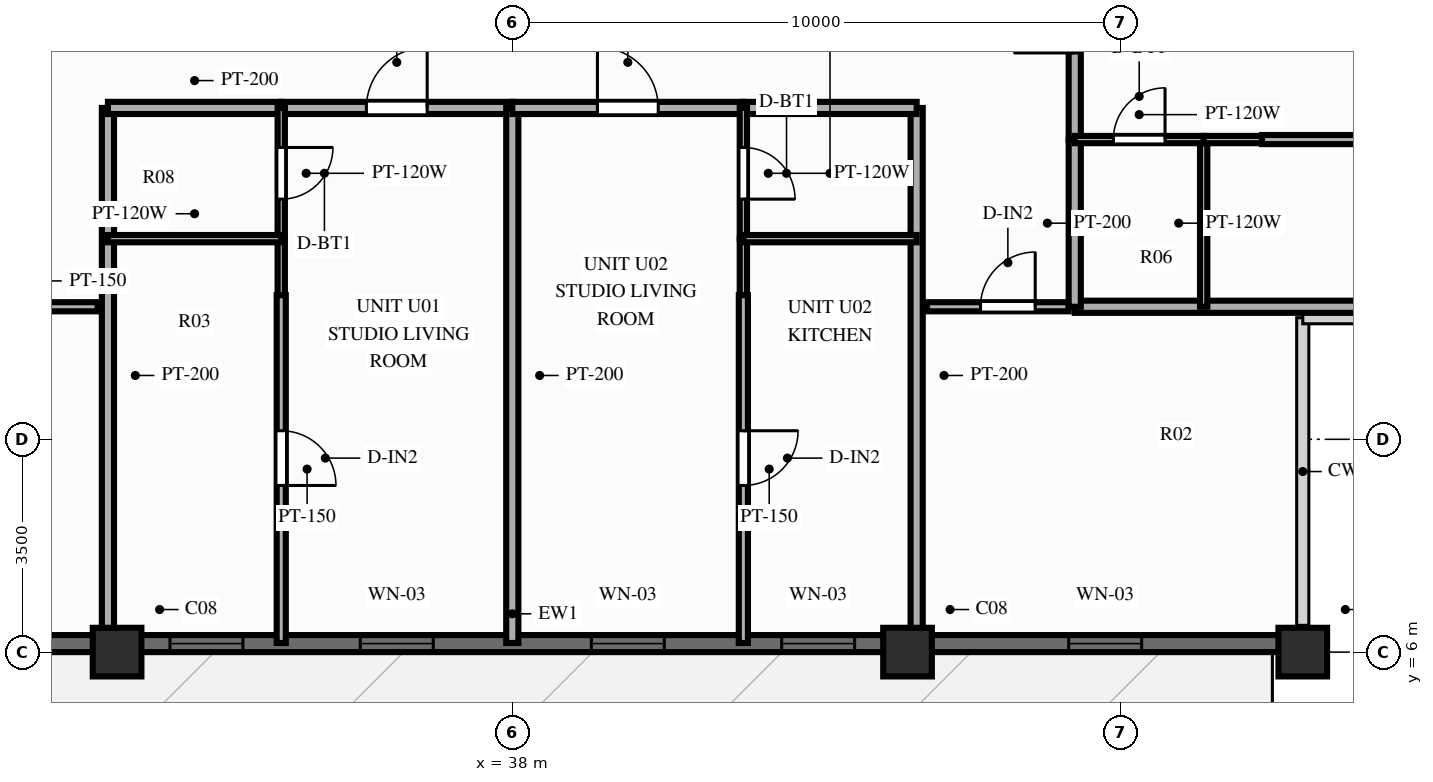
"""IFC4 building model, lengths in metres.
Left out: names, types, materials, properties, quantities, classifications, styles, units other than length and angle.
Written with IfcOpenShell. Run it as: python <this file> out.ifc"""

import sys

from ifc_helpers import new_model, si_unit, direction, frame, frame_2d, origin, origin_2d, place, context, subcontext, project, spatial, rectangle, extrude, source, transform, mapped, element, fill, save


model = new_model("IFC4")
c1 = context("Model", 3, precision=1e-05, world=origin(), true_north=direction((0.0, 1.0)))
c2 = subcontext(c1, "Body", "Model", "MODEL_VIEW")
j1 = project(units=[si_unit("LENGTHUNIT", "METRE"), si_unit("PLANEANGLEUNIT", "RADIAN")], contexts=[c1])
p1 = place(None, origin())
s1 = spatial("IfcSite", under=j1, at=p1, CompositionType="ELEMENT")
p2 = place(p1, origin())
s2 = spatial("IfcBuilding", under=s1, at=p2, CompositionType="ELEMENT")
p3 = place(p2, frame((0.0, 0.0, 196.6)))
s3 = spatial("IfcBuildingStorey", under=s2, at=p3, CompositionType="ELEMENT", Elevation=196.6)
m1 = source(origin(), c2, "Body", "SweptSolid", [
    extrude(rectangle(XDim=0.8, YDim=0.8, at=origin_2d()), origin(), (0.0, 0.0, 1.0), 3.0),
])
for number, where, z_axis, x_axis in (
    (1, (31.5, 6.0, 0.0), (0.0, 0.0, 1.0), (1.0, 0.0, 0.0)),
    (2, (44.5, 6.0, 0.0), (0.0, 0.0, 1.0), (1.0, 0.0, 0.0)),
    (3, (51.0, 6.0, 0.0), (0.0, 0.0, 1.0), (1.0, 0.0, 0.0)),
):
    element("IfcColumn", number, at=place(p3, frame(where, z_axis=z_axis, x_axis=x_axis)), inside=s3, PredefinedType="COLUMN", context=c2, shape_type="MappedRepresentation", body=[
        mapped(m1, transform((0.0, 0.0, 0.0), scale=1.0)),
    ])
p4 = place(p3, frame((25.0, 6.14, 0.0), z_axis=(0.0, 0.0, 1.0), x_axis=(1.0, 0.0, 0.0)))
e4 = element("IfcWall", 4, at=p4, inside=s3, PredefinedType="SOLIDWALL", context=c2, shape_type="SweptSolid", body=[
    extrude(rectangle(XDim=26.0, YDim=0.28, at=frame_2d((13.0, 0.0))), origin(), (0.0, 0.0, 1.0), 2.28),
])
p5 = place(p4, frame((3.8, 0.0, 0.0), z_axis=(0.0, 0.0, 1.0), x_axis=(-1.0, 0.0, 0.0)))
e5 = element("IfcOpeningElement", 5, at=p5, cuts=e4, PredefinedType="OPENING", context=c2, shape_type="SweptSolid", body=[
    extrude(rectangle(XDim=1.1, YDim=2.15, at=frame_2d((0.55, 1.075))), frame((0.0, 0.152, 0.0), z_axis=(0.0, -1.0, 0.0), x_axis=(1.0, 0.0, 0.0)), (0.0, 0.0, 1.0), 0.304),
])
p6 = place(p4, frame((7.37, 0.0, 0.25)))
e6 = element("IfcOpeningElement", 6, at=p6, cuts=e4, PredefinedType="OPENING", context=c2, shape_type="SweptSolid", body=[
    extrude(rectangle(XDim=1.2, YDim=1.5, at=frame_2d((0.6, 0.75))), frame((0.0, 0.152, 0.0), z_axis=(0.0, -1.0, 0.0), x_axis=(1.0, 0.0, 0.0)), (0.0, 0.0, 1.0), 0.304),
])
p7 = place(p4, frame((10.5, 0.0, 0.25)))
e7 = element("IfcOpeningElement", 7, at=p7, cuts=e4, PredefinedType="OPENING", context=c2, shape_type="SweptSolid", body=[
    extrude(rectangle(XDim=1.2, YDim=1.5, at=frame_2d((0.6, 0.75))), frame((0.0, 0.152, 0.0), z_axis=(0.0, -1.0, 0.0), x_axis=(1.0, 0.0, 0.0)), (0.0, 0.0, 1.0), 0.304),
])
p8 = place(p4, frame((14.3, 0.0, 0.25)))
e8 = element("IfcOpeningElement", 8, at=p8, cuts=e4, PredefinedType="OPENING", context=c2, shape_type="SweptSolid", body=[
    extrude(rectangle(XDim=1.2, YDim=1.5, at=frame_2d((0.6, 0.75))), frame((0.0, 0.152, 0.0), z_axis=(0.0, -1.0, 0.0), x_axis=(1.0, 0.0, 0.0)), (0.0, 0.0, 1.0), 0.304),
])
p9 = place(p4, frame((17.43, 0.0, 0.25)))
e9 = element("IfcOpeningElement", 9, at=p9, cuts=e4, PredefinedType="OPENING", context=c2, shape_type="SweptSolid", body=[
    extrude(rectangle(XDim=1.2, YDim=1.5, at=frame_2d((0.6, 0.75))), frame((0.0, 0.152, 0.0), z_axis=(0.0, -1.0, 0.0), x_axis=(1.0, 0.0, 0.0)), (0.0, 0.0, 1.0), 0.304),
])
p10 = place(p4, frame((22.15, 0.0, 0.25)))
e10 = element("IfcOpeningElement", 10, at=p10, cuts=e4, PredefinedType="OPENING", context=c2, shape_type="SweptSolid", body=[
    extrude(rectangle(XDim=1.2, YDim=1.5, at=frame_2d((0.6, 0.75))), frame((0.0, 0.152, 0.0), z_axis=(0.0, -1.0, 0.0), x_axis=(1.0, 0.0, 0.0)), (0.0, 0.0, 1.0), 0.304),
])
p11 = place(p3, frame((28.85, 11.68, 0.0), z_axis=(0.0, 0.0, 1.0), x_axis=(1.0, 0.0, 0.0)))
e11 = element("IfcWall", 11, at=p11, inside=s3, PredefinedType="PARTITIONING", context=c2, shape_type="SweptSolid", body=[
    extrude(rectangle(XDim=2.33, YDim=0.15, at=frame_2d((1.165, 0.0))), origin(), (0.0, 0.0, 1.0), 2.79),
])
p12 = place(p11, frame((0.55, 0.0, 0.0)))
e12 = element("IfcOpeningElement", 12, at=p12, cuts=e11, PredefinedType="OPENING", context=c2, shape_type="SweptSolid", body=[
    extrude(rectangle(XDim=0.9, YDim=2.1, at=frame_2d((0.45, 1.05))), frame((0.0, 0.087, 0.0), z_axis=(0.0, -1.0, 0.0), x_axis=(1.0, 0.0, 0.0)), (0.0, 0.0, 1.0), 0.174),
])
p13 = place(p3, frame((44.82, 11.68, 0.0), z_axis=(0.0, 0.0, 1.0), x_axis=(1.0, 0.0, 0.0)))
e13 = element("IfcWall", 13, at=p13, inside=s3, PredefinedType="PARTITIONING", context=c2, shape_type="SweptSolid", body=[
    extrude(rectangle(XDim=2.33, YDim=0.15, at=frame_2d((1.165, 0.0))), origin(), (0.0, 0.0, 1.0), 2.79),
])
p14 = place(p13, frame((0.88, 0.0, 0.0)))
e14 = element("IfcOpeningElement", 14, at=p14, cuts=e13, PredefinedType="OPENING", context=c2, shape_type="SweptSolid", body=[
    extrude(rectangle(XDim=0.9, YDim=2.1, at=frame_2d((0.45, 1.05))), frame((0.0, 0.087, 0.0), z_axis=(0.0, -1.0, 0.0), x_axis=(1.0, 0.0, 0.0)), (0.0, 0.0, 1.0), 0.174),
])
for number, where, z_axis, x_axis in (
    (15, (31.35, 14.95, 0.0), (0.0, 0.0, 1.0), (0.0, -1.0, 0.0)),
    (16, (44.65, 14.95, 0.0), (0.0, 0.0, 1.0), (0.0, -1.0, 0.0)),
):
    element("IfcWall", number, at=place(p3, frame(where, z_axis=z_axis, x_axis=x_axis)), inside=s3, PredefinedType="PARTITIONING", context=c2, shape_type="SweptSolid", body=[
        extrude(rectangle(XDim=8.8, YDim=0.2, at=frame_2d((4.4, 0.0))), origin(), (0.0, 0.0, 1.0), 2.39),
    ])
p15 = place(p3, frame((31.35, 14.95, 0.0), z_axis=(0.0, 0.0, 1.0), x_axis=(1.0, 0.0, 0.0)))
e17 = element("IfcWall", 17, at=p15, inside=s3, PredefinedType="PARTITIONING", context=c2, shape_type="SweptSolid", body=[
    extrude(rectangle(XDim=2.85, YDim=0.2, at=frame_2d((1.425, 0.0))), origin(), (0.0, 0.0, 1.0), 2.79),
])
p16 = place(p3, frame((34.2, 14.95, 0.0), z_axis=(0.0, 0.0, 1.0), x_axis=(1.0, 0.0, 0.0)))
e18 = element("IfcWall", 18, at=p16, inside=s3, PredefinedType="PARTITIONING", context=c2, shape_type="SweptSolid", body=[
    extrude(rectangle(XDim=3.8, YDim=0.2, at=frame_2d((1.9, 0.0))), origin(), (0.0, 0.0, 1.0), 2.79),
])
p17 = place(p16, frame((1.4, 0.0, 0.0)))
e19 = element("IfcOpeningElement", 19, at=p17, cuts=e18, PredefinedType="OPENING", context=c2, shape_type="SweptSolid", body=[
    extrude(rectangle(XDim=1.0, YDim=2.15, at=frame_2d((0.5, 1.075))), frame((0.0, 0.112, 0.0), z_axis=(0.0, -1.0, 0.0), x_axis=(1.0, 0.0, 0.0)), (0.0, 0.0, 1.0), 0.224),
])
p18 = place(p3, frame((34.2, 14.95, 0.0), z_axis=(0.0, 0.0, 1.0), x_axis=(0.0, -1.0, 0.0)))
e20 = element("IfcWall", 20, at=p18, inside=s3, PredefinedType="PARTITIONING", context=c2, shape_type="SweptSolid", body=[
    extrude(rectangle(XDim=2.15, YDim=0.12, at=frame_2d((1.075, 0.0))), origin(), (0.0, 0.0, 1.0), 2.79),
])
p19 = place(p18, frame((0.65, 0.0, 0.0)))
e21 = element("IfcOpeningElement", 21, at=p19, cuts=e20, PredefinedType="OPENING", context=c2, shape_type="SweptSolid", body=[
    extrude(rectangle(XDim=0.85, YDim=2.05, at=frame_2d((0.425, 1.025))), frame((0.0, 0.072, 0.0), z_axis=(0.0, -1.0, 0.0), x_axis=(1.0, 0.0, 0.0)), (0.0, 0.0, 1.0), 0.144),
])
p20 = place(p3, frame((34.2, 12.8, 0.0), z_axis=(0.0, 0.0, 1.0), x_axis=(0.0, -1.0, 0.0)))
e22 = element("IfcWall", 22, at=p20, inside=s3, PredefinedType="PARTITIONING", context=c2, shape_type="SweptSolid", body=[
    extrude(rectangle(XDim=0.93, YDim=0.12, at=frame_2d((0.465, 0.0))), origin(), (0.0, 0.0, 1.0), 2.79),
])
p21 = place(p3, frame((31.35, 12.8, 0.0), z_axis=(0.0, 0.0, 1.0), x_axis=(1.0, 0.0, 0.0)))
e23 = element("IfcWall", 23, at=p21, inside=s3, PredefinedType="PARTITIONING", context=c2, shape_type="SweptSolid", body=[
    extrude(rectangle(XDim=2.85, YDim=0.12, at=frame_2d((1.425, 0.0))), origin(), (0.0, 0.0, 1.0), 2.79),
])
p22 = place(p3, frame((34.2, 11.87, 0.0), z_axis=(0.0, 0.0, 1.0), x_axis=(0.0, -1.0, 0.0)))
e24 = element("IfcWall", 24, at=p22, inside=s3, PredefinedType="PARTITIONING", context=c2, shape_type="SweptSolid", body=[
    extrude(rectangle(XDim=5.72, YDim=0.15, at=frame_2d((2.86, 0.0))), origin(), (0.0, 0.0, 1.0), 2.79),
])
p23 = place(p22, frame((2.229, 0.0, 0.0)))
e25 = element("IfcOpeningElement", 25, at=p23, cuts=e24, PredefinedType="OPENING", context=c2, shape_type="SweptSolid", body=[
    extrude(rectangle(XDim=0.9, YDim=2.1, at=frame_2d((0.45, 1.05))), frame((0.0, 0.087, 0.0), z_axis=(0.0, -1.0, 0.0), x_axis=(1.0, 0.0, 0.0)), (0.0, 0.0, 1.0), 0.174),
])
p24 = place(p3, frame((38.0, 14.95, 0.0), z_axis=(0.0, 0.0, 1.0), x_axis=(0.0, -1.0, 0.0)))
e26 = element("IfcWall", 26, at=p24, inside=s3, PredefinedType="PARTITIONING", context=c2, shape_type="SweptSolid", body=[
    extrude(rectangle(XDim=8.8, YDim=0.2, at=frame_2d((4.4, 0.0))), origin(), (0.0, 0.0, 1.0), 2.79),
])
p25 = place(p3, frame((38.0, 14.95, 0.0), z_axis=(0.0, 0.0, 1.0), x_axis=(1.0, 0.0, 0.0)))
e27 = element("IfcWall", 27, at=p25, inside=s3, PredefinedType="PARTITIONING", context=c2, shape_type="SweptSolid", body=[
    extrude(rectangle(XDim=3.8, YDim=0.2, at=frame_2d((1.9, 0.0))), origin(), (0.0, 0.0, 1.0), 2.79),
])
p26 = place(p25, frame((1.4, 0.0, 0.0)))
e28 = element("IfcOpeningElement", 28, at=p26, cuts=e27, PredefinedType="OPENING", context=c2, shape_type="SweptSolid", body=[
    extrude(rectangle(XDim=1.0, YDim=2.15, at=frame_2d((0.5, 1.075))), frame((0.0, 0.112, 0.0), z_axis=(0.0, -1.0, 0.0), x_axis=(1.0, 0.0, 0.0)), (0.0, 0.0, 1.0), 0.224),
])
p27 = place(p3, frame((41.8, 14.95, 0.0), z_axis=(0.0, 0.0, 1.0), x_axis=(1.0, 0.0, 0.0)))
e29 = element("IfcWall", 29, at=p27, inside=s3, PredefinedType="PARTITIONING", context=c2, shape_type="SweptSolid", body=[
    extrude(rectangle(XDim=2.85, YDim=0.2, at=frame_2d((1.425, 0.0))), origin(), (0.0, 0.0, 1.0), 2.79),
])
p28 = place(p3, frame((41.8, 14.95, 0.0), z_axis=(0.0, 0.0, 1.0), x_axis=(0.0, -1.0, 0.0)))
e30 = element("IfcWall", 30, at=p28, inside=s3, PredefinedType="PARTITIONING", context=c2, shape_type="SweptSolid", body=[
    extrude(rectangle(XDim=2.15, YDim=0.12, at=frame_2d((1.075, 0.0))), origin(), (0.0, 0.0, 1.0), 2.79),
])
p29 = place(p28, frame((0.65, 0.0, 0.0)))
e31 = element("IfcOpeningElement", 31, at=p29, cuts=e30, PredefinedType="OPENING", context=c2, shape_type="SweptSolid", body=[
    extrude(rectangle(XDim=0.85, YDim=2.05, at=frame_2d((0.425, 1.025))), frame((0.0, 0.072, 0.0), z_axis=(0.0, -1.0, 0.0), x_axis=(1.0, 0.0, 0.0)), (0.0, 0.0, 1.0), 0.144),
])
p30 = place(p3, frame((41.8, 12.8, 0.0), z_axis=(0.0, 0.0, 1.0), x_axis=(0.0, -1.0, 0.0)))
e32 = element("IfcWall", 32, at=p30, inside=s3, PredefinedType="PARTITIONING", context=c2, shape_type="SweptSolid", body=[
    extrude(rectangle(XDim=0.93, YDim=0.12, at=frame_2d((0.465, 0.0))), origin(), (0.0, 0.0, 1.0), 2.79),
])
p31 = place(p3, frame((41.8, 12.8, 0.0), z_axis=(0.0, 0.0, 1.0), x_axis=(1.0, 0.0, 0.0)))
e33 = element("IfcWall", 33, at=p31, inside=s3, PredefinedType="PARTITIONING", context=c2, shape_type="SweptSolid", body=[
    extrude(rectangle(XDim=2.85, YDim=0.12, at=frame_2d((1.425, 0.0))), origin(), (0.0, 0.0, 1.0), 2.79),
])
p32 = place(p3, frame((41.8, 11.87, 0.0), z_axis=(0.0, 0.0, 1.0), x_axis=(0.0, -1.0, 0.0)))
e34 = element("IfcWall", 34, at=p32, inside=s3, PredefinedType="PARTITIONING", context=c2, shape_type="SweptSolid", body=[
    extrude(rectangle(XDim=5.72, YDim=0.15, at=frame_2d((2.86, 0.0))), origin(), (0.0, 0.0, 1.0), 2.79),
])
p33 = place(p32, frame((2.229, 0.0, 0.0)))
e35 = element("IfcOpeningElement", 35, at=p33, cuts=e34, PredefinedType="OPENING", context=c2, shape_type="SweptSolid", body=[
    extrude(rectangle(XDim=0.9, YDim=2.1, at=frame_2d((0.45, 1.05))), frame((0.0, 0.087, 0.0), z_axis=(0.0, -1.0, 0.0), x_axis=(1.0, 0.0, 0.0)), (0.0, 0.0, 1.0), 0.174),
])
p34 = place(p3, frame((47.25, 11.68, 0.0), z_axis=(0.0, 0.0, 1.0), x_axis=(1.0, 0.0, 0.0)))
e36 = element("IfcWall", 36, at=p34, inside=s3, PredefinedType="PARTITIONING", context=c2, shape_type="SweptSolid", body=[
    extrude(rectangle(XDim=9.1, YDim=0.2, at=frame_2d((4.55, 0.0))), origin(), (0.0, 0.0, 1.0), 2.79),
])
p35 = place(p3, frame((47.25, 11.68, 0.0), z_axis=(0.0, 0.0, 1.0), x_axis=(0.0, 1.0, 0.0)))
e37 = element("IfcWall", 37, at=p35, inside=s3, PredefinedType="PARTITIONING", context=c2, shape_type="SweptSolid", body=[
    extrude(rectangle(XDim=2.75, YDim=0.2, at=frame_2d((1.375, 0.0))), origin(), (0.0, 0.0, 1.0), 2.79),
])
p36 = place(p3, frame((47.25, 14.43, 0.0), z_axis=(0.0, 0.0, 1.0), x_axis=(0.0, 1.0, 0.0)))
e38 = element("IfcWall", 38, at=p36, inside=s3, PredefinedType="PARTITIONING", context=c2, shape_type="SweptSolid", body=[
    extrude(rectangle(XDim=3.85, YDim=0.2, at=frame_2d((1.925, 0.0))), origin(), (0.0, 0.0, 1.0), 2.79),
])
p37 = place(p36, frame((1.425, 0.0, 0.0)))
e39 = element("IfcOpeningElement", 39, at=p37, cuts=e38, PredefinedType="OPENING", context=c2, shape_type="SweptSolid", body=[
    extrude(rectangle(XDim=1.0, YDim=2.15, at=frame_2d((0.5, 1.075))), frame((0.0, 0.112, 0.0), z_axis=(0.0, -1.0, 0.0), x_axis=(1.0, 0.0, 0.0)), (0.0, 0.0, 1.0), 0.224),
])
p38 = place(p3, frame((49.37, 11.68, 0.0), z_axis=(0.0, 0.0, 1.0), x_axis=(0.0, 1.0, 0.0)))
e40 = element("IfcWall", 40, at=p38, inside=s3, PredefinedType="PARTITIONING", context=c2, shape_type="SweptSolid", body=[
    extrude(rectangle(XDim=2.75, YDim=0.12, at=frame_2d((1.375, 0.0))), origin(), (0.0, 0.0, 1.0), 2.79),
])
p39 = place(p3, frame((47.25, 14.43, 0.0), z_axis=(0.0, 0.0, 1.0), x_axis=(1.0, 0.0, 0.0)))
e41 = element("IfcWall", 41, at=p39, inside=s3, PredefinedType="PARTITIONING", context=c2, shape_type="SweptSolid", body=[
    extrude(rectangle(XDim=2.12, YDim=0.12, at=frame_2d((1.06, 0.0))), origin(), (0.0, 0.0, 1.0), 2.79),
])
p40 = place(p39, frame((0.635, 0.0, 0.0)))
e42 = element("IfcOpeningElement", 42, at=p40, cuts=e41, PredefinedType="OPENING", context=c2, shape_type="SweptSolid", body=[
    extrude(rectangle(XDim=0.85, YDim=2.05, at=frame_2d((0.425, 1.025))), frame((0.0, 0.072, 0.0), z_axis=(0.0, -1.0, 0.0), x_axis=(1.0, 0.0, 0.0)), (0.0, 0.0, 1.0), 0.144),
])
p41 = place(p3, frame((49.37, 14.43, 0.0), z_axis=(0.0, 0.0, 1.0), x_axis=(1.0, 0.0, 0.0)))
e43 = element("IfcWall", 43, at=p41, inside=s3, PredefinedType="PARTITIONING", context=c2, shape_type="SweptSolid", body=[
    extrude(rectangle(XDim=0.96, YDim=0.12, at=frame_2d((0.48, 0.0))), origin(), (0.0, 0.0, 1.0), 2.79),
])
p42 = place(p3, frame((50.33, 14.43, 0.0), z_axis=(0.0, 0.0, 1.0), x_axis=(1.0, 0.0, 0.0)))
e44 = element("IfcWall", 44, at=p42, inside=s3, PredefinedType="PARTITIONING", context=c2, shape_type="SweptSolid", body=[
    extrude(rectangle(XDim=6.02, YDim=0.15, at=frame_2d((3.01, 0.0))), origin(), (0.0, 0.0, 1.0), 2.79),
])
p43 = place(p42, frame((2.367, 0.0, 0.0)))
e45 = element("IfcOpeningElement", 45, at=p43, cuts=e44, PredefinedType="OPENING", context=c2, shape_type="SweptSolid", body=[
    extrude(rectangle(XDim=0.9, YDim=2.1, at=frame_2d((0.45, 1.05))), frame((0.0, 0.087, 0.0), z_axis=(0.0, -1.0, 0.0), x_axis=(1.0, 0.0, 0.0)), (0.0, 0.0, 1.0), 0.174),
])
m2 = source(origin(), c2, "Body", "SweptSolid", [
    extrude(rectangle(XDim=1.2, YDim=1.5, at=frame_2d((0.6, 0.75))), frame((0.0, 0.03, 0.0), z_axis=(0.0, -1.0, 0.0), x_axis=(1.0, 0.0, 0.0)), (0.0, 0.0, 1.0), 0.06),
])
p44 = place(p6, origin())
e46 = element("IfcWindow", 46, at=p44, inside=s3, PartitioningType="SINGLE_PANEL", PredefinedType="WINDOW", context=c2, shape_type="MappedRepresentation", body=[
    mapped(m2, transform((0.0, 0.0, 0.0), scale=1.0)),
])
fill(e6, e46)
p45 = place(p7, origin())
e47 = element("IfcWindow", 47, at=p45, inside=s3, PartitioningType="SINGLE_PANEL", PredefinedType="WINDOW", context=c2, shape_type="MappedRepresentation", body=[
    mapped(m2, transform((0.0, 0.0, 0.0), scale=1.0)),
])
fill(e7, e47)
p46 = place(p8, origin())
e48 = element("IfcWindow", 48, at=p46, inside=s3, PartitioningType="SINGLE_PANEL", PredefinedType="WINDOW", context=c2, shape_type="MappedRepresentation", body=[
    mapped(m2, transform((0.0, 0.0, 0.0), scale=1.0)),
])
fill(e8, e48)
p47 = place(p9, origin())
e49 = element("IfcWindow", 49, at=p47, inside=s3, PartitioningType="SINGLE_PANEL", PredefinedType="WINDOW", context=c2, shape_type="MappedRepresentation", body=[
    mapped(m2, transform((0.0, 0.0, 0.0), scale=1.0)),
])
fill(e9, e49)
p48 = place(p10, origin())
e50 = element("IfcWindow", 50, at=p48, inside=s3, PartitioningType="SINGLE_PANEL", PredefinedType="WINDOW", context=c2, shape_type="MappedRepresentation", body=[
    mapped(m2, transform((0.0, 0.0, 0.0), scale=1.0)),
])
fill(e10, e50)
m3 = source(origin(), c2, "Body", "SweptSolid", [
    extrude(rectangle(XDim=0.9, YDim=2.1, at=frame_2d((0.45, 1.05))), frame((0.0, 0.025, 0.0), z_axis=(0.0, -1.0, 0.0), x_axis=(1.0, 0.0, 0.0)), (0.0, 0.0, 1.0), 0.05),
])
p49 = place(p14, origin())
e51 = element("IfcDoor", 51, at=p49, inside=s3, OperationType="SINGLE_SWING_RIGHT", PredefinedType="DOOR", context=c2, shape_type="MappedRepresentation", body=[
    mapped(m3, transform((0.0, 0.0, 0.0), scale=1.0)),
])
fill(e14, e51)
m4 = source(origin(), c2, "Body", "SweptSolid", [
    extrude(rectangle(XDim=1.0, YDim=2.15, at=frame_2d((0.5, 1.075))), frame((0.0, 0.025, 0.0), z_axis=(0.0, -1.0, 0.0), x_axis=(1.0, 0.0, 0.0)), (0.0, 0.0, 1.0), 0.05),
])
p50 = place(p17, origin())
e52 = element("IfcDoor", 52, at=p50, inside=s3, OperationType="SINGLE_SWING_RIGHT", PredefinedType="DOOR", context=c2, shape_type="MappedRepresentation", body=[
    mapped(m4, transform((0.0, 0.0, 0.0), scale=1.0)),
])
fill(e19, e52)
m5 = source(origin(), c2, "Body", "SweptSolid", [
    extrude(rectangle(XDim=0.85, YDim=2.05, at=frame_2d((0.425, 1.025))), frame((0.0, 0.025, 0.0), z_axis=(0.0, -1.0, 0.0), x_axis=(1.0, 0.0, 0.0)), (0.0, 0.0, 1.0), 0.05),
])
p51 = place(p19, origin())
e53 = element("IfcDoor", 53, at=p51, inside=s3, OperationType="SINGLE_SWING_LEFT", PredefinedType="DOOR", context=c2, shape_type="MappedRepresentation", body=[
    mapped(m5, transform((0.0, 0.0, 0.0), scale=1.0)),
])
fill(e21, e53)
p52 = place(p23, origin())
e54 = element("IfcDoor", 54, at=p52, inside=s3, OperationType="SINGLE_SWING_RIGHT", PredefinedType="DOOR", context=c2, shape_type="MappedRepresentation", body=[
    mapped(m3, transform((0.0, 0.0, 0.0), scale=1.0)),
])
fill(e25, e54)
p53 = place(p26, origin())
e55 = element("IfcDoor", 55, at=p53, inside=s3, OperationType="SINGLE_SWING_LEFT", PredefinedType="DOOR", context=c2, shape_type="MappedRepresentation", body=[
    mapped(m4, transform((0.0, 0.0, 0.0), scale=1.0)),
])
fill(e28, e55)
p54 = place(p29, origin())
e56 = element("IfcDoor", 56, at=p54, inside=s3, OperationType="SINGLE_SWING_RIGHT", PredefinedType="DOOR", context=c2, shape_type="MappedRepresentation", body=[
    mapped(m5, transform((0.0, 0.0, 0.0), scale=1.0)),
])
fill(e31, e56)
p55 = place(p33, origin())
e57 = element("IfcDoor", 57, at=p55, inside=s3, OperationType="SINGLE_SWING_LEFT", PredefinedType="DOOR", context=c2, shape_type="MappedRepresentation", body=[
    mapped(m3, transform((0.0, 0.0, 0.0), scale=1.0)),
])
fill(e35, e57)
p56 = place(p37, origin())
e58 = element("IfcDoor", 58, at=p56, inside=s3, OperationType="SINGLE_SWING_LEFT", PredefinedType="DOOR", context=c2, shape_type="MappedRepresentation", body=[
    mapped(m4, transform((0.0, 0.0, 0.0), scale=1.0)),
])
fill(e39, e58)
p57 = place(p40, origin())
e59 = element("IfcDoor", 59, at=p57, inside=s3, OperationType="SINGLE_SWING_RIGHT", PredefinedType="DOOR", context=c2, shape_type="MappedRepresentation", body=[
    mapped(m5, transform((0.0, 0.0, 0.0), scale=1.0)),
])
fill(e42, e59)
save(model, sys.argv[1])
